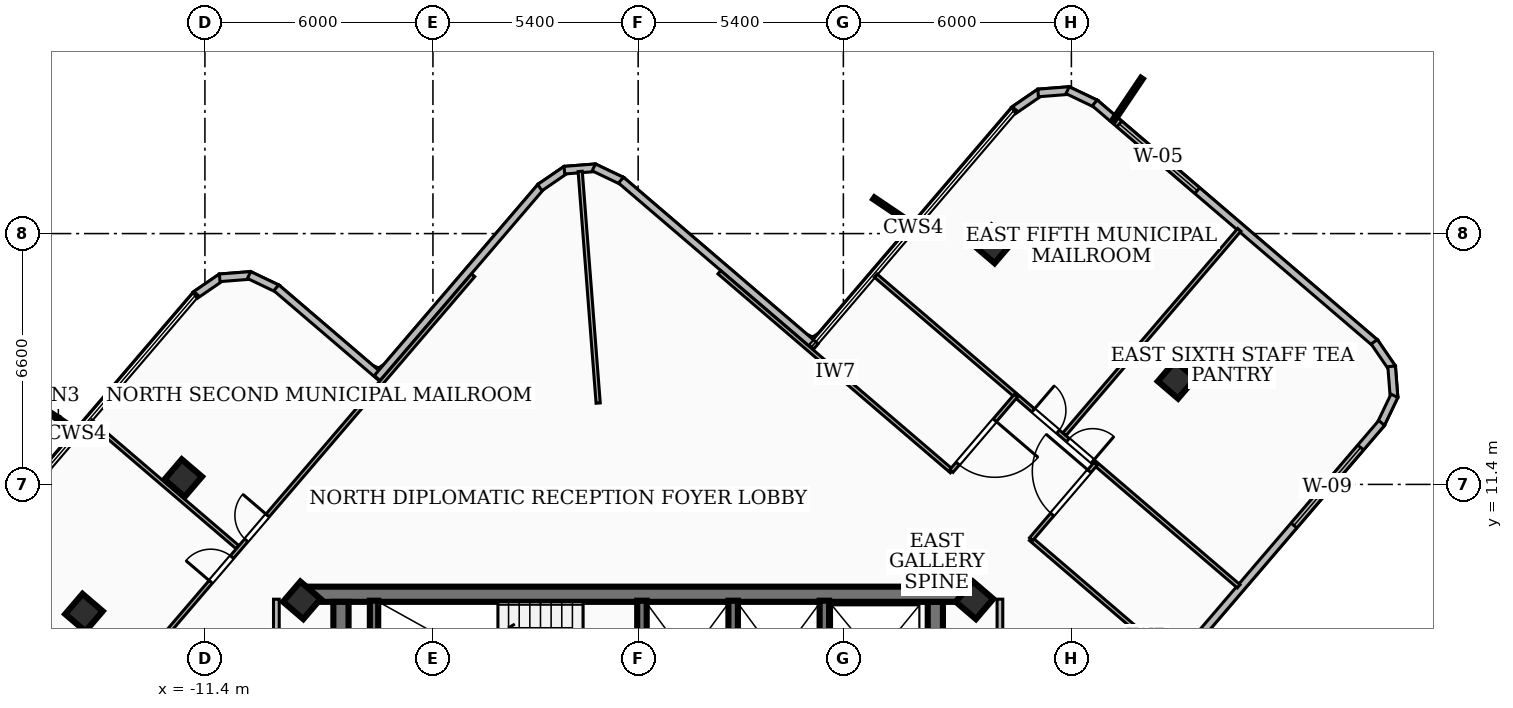
"""IFC4 building model, lengths in metres.
Left out: names, types, materials, properties, quantities, classifications, styles, units other than length and angle.
Written with IfcOpenShell. Run it as: python <this file> out.ifc"""

import sys

from ifc_helpers import new_model, si_unit, direction, frame, frame_2d, origin, origin_2d, place, context, subcontext, project, spatial, rectangle, extrude, element, fill, save


model = new_model("IFC4")
c1 = context("Model", 3, precision=1e-05, world=origin(), true_north=direction((0.0, 1.0)))
c2 = subcontext(c1, "Body", "Model", "MODEL_VIEW")
j1 = project(units=[si_unit("LENGTHUNIT", "METRE"), si_unit("PLANEANGLEUNIT", "RADIAN")], contexts=[c1])
p1 = place(None, origin())
s1 = spatial("IfcSite", under=j1, at=p1, CompositionType="ELEMENT")
p2 = place(p1, origin())
s2 = spatial("IfcBuilding", under=s1, at=p2, CompositionType="ELEMENT")
p3 = place(p2, frame((0.0, 0.0, 254.34)))
s3 = spatial("IfcBuildingStorey", under=s2, at=p3, CompositionType="ELEMENT", Elevation=254.34)
p4 = place(p3, frame((-8.78, 8.51, 0.0), z_axis=(0.0, 0.0, 1.0), x_axis=(1.0, 0.0, 0.0)))
e1 = element("IfcWall", 1, at=p4, inside=s3, PredefinedType="SHEAR", context=c2, shape_type="SweptSolid", body=[
    extrude(rectangle(XDim=17.56, YDim=0.4, at=frame_2d((8.78, 0.0))), origin(), (0.0, 0.0, 1.0), 3.16),
])
for number, where, z_axis, x_axis in (
    (2, (-7.82, 1.95, 0.0), (0.0, 0.0, 1.0), (0.0, 1.0, 0.0)),
    (3, (7.82, 8.31, 0.0), (0.0, 0.0, 1.0), (0.0, -1.0, 0.0)),
):
    element("IfcWall", number, at=place(p3, frame(where, z_axis=z_axis, x_axis=x_axis)), inside=s3, PredefinedType="SHEAR", context=c2, shape_type="SweptSolid", body=[
        extrude(rectangle(XDim=6.36, YDim=0.4, at=frame_2d((3.18, 0.0))), origin(), (0.0, 0.0, 1.0), 3.16),
    ])
p5 = place(p3, frame((-6.95, 5.28, 0.0), z_axis=(0.0, 0.0, 1.0), x_axis=(0.0, 1.0, 0.0)))
e4 = element("IfcWall", 4, at=p5, inside=s3, PredefinedType="SOLIDWALL", context=c2, shape_type="SweptSolid", body=[
    extrude(rectangle(XDim=3.06, YDim=0.22, at=frame_2d((1.53, 0.0))), origin(), (0.0, 0.0, 1.0), 3.16),
])
for number, where, z_axis, x_axis in (
    (5, (0.1, 5.3, 0.0), (0.0, 0.0, 1.0), (0.0, 1.0, 0.0)),
    (6, (2.5, 5.3, 0.0), (0.0, 0.0, 1.0), (0.0, 1.0, 0.0)),
    (7, (4.9, 5.3, 0.0), (0.0, 0.0, 1.0), (0.0, 1.0, 0.0)),
):
    element("IfcWall", number, at=place(p3, frame(where, z_axis=z_axis, x_axis=x_axis)), inside=s3, PredefinedType="SOLIDWALL", context=c2, shape_type="SweptSolid", body=[
        extrude(rectangle(XDim=3.04, YDim=0.25, at=frame_2d((1.52, 0.0))), origin(), (0.0, 0.0, 1.0), 3.16),
    ])
for number, where, z_axis, x_axis in (
    (8, (-8.85, 8.35, 0.0), (0.0, 0.0, 1.0), (0.65, 0.76, 0.0)),
    (9, (8.85, 8.35, 0.0), (0.0, 0.0, 1.0), (0.65, 0.76, 0.0)),
    (10, (14.169, 14.152, 0.0), (0.0, 0.0, 1.0), (0.65, 0.76, 0.0)),
    (11, (9.341, 17.714, 0.0), (0.0, 0.0, 1.0), (0.65, 0.76, 0.0)),
    (12, (-11.971, 11.566, 0.0), (0.0, 0.0, 1.0), (0.65, 0.76, 0.0)),
    (13, (-14.583, 8.026, 0.0), (0.0, 0.0, 1.0), (0.65, 0.76, 0.0)),
):
    element("IfcColumn", number, at=place(p3, frame(where, z_axis=z_axis, x_axis=x_axis)), inside=s3, PredefinedType="COLUMN", context=c2, shape_type="SweptSolid", body=[
        extrude(rectangle(XDim=0.7, YDim=0.7, at=origin_2d()), origin(), (0.0, 0.0, 1.0), 3.42),
    ])
p6 = place(p3, frame((-11.658, 16.378, 0.0), z_axis=(0.0, 0.0, 1.0), x_axis=(0.824907237821, 0.565268121329, 0.0)))
e14 = element("IfcWall", 14, at=p6, inside=s3, PredefinedType="SOLIDWALL", context=c2, shape_type="SweptSolid", body=[
    extrude(rectangle(XDim=0.839, YDim=0.2, at=frame_2d((0.419, 0.0))), origin(), (0.0, 0.0, 1.0), 3.16),
])
p7 = place(p3, frame((-11.012, 16.836, 0.0), z_axis=(0.0, 0.0, 1.0), x_axis=(0.996986164412, 0.077579558977, 0.0)))
e15 = element("IfcWall", 15, at=p7, inside=s3, PredefinedType="SOLIDWALL", context=c2, shape_type="SweptSolid", body=[
    extrude(rectangle(XDim=0.824, YDim=0.2, at=frame_2d((0.412, 0.0))), origin(), (0.0, 0.0, 1.0), 3.16),
])
p8 = place(p3, frame((-10.238, 16.909, 0.0), z_axis=(0.0, 0.0, 1.0), x_axis=(0.902473334209, -0.430745726666, 0.0)))
e16 = element("IfcWall", 16, at=p8, inside=s3, PredefinedType="SOLIDWALL", context=c2, shape_type="SweptSolid", body=[
    extrude(rectangle(XDim=0.84, YDim=0.2, at=frame_2d((0.42, 0.0))), origin(), (0.0, 0.0, 1.0), 3.16),
])
p9 = place(p3, frame((-9.522, 16.574, 0.0), z_axis=(0.0, 0.0, 1.0), x_axis=(0.759914066759, -0.650023546606, 0.0)))
e17 = element("IfcWall", 17, at=p9, inside=s3, PredefinedType="SOLIDWALL", context=c2, shape_type="SweptSolid", body=[
    extrude(rectangle(XDim=3.641, YDim=0.2, at=frame_2d((1.821, 0.0))), origin(), (0.0, 0.0, 1.0), 3.16),
])
p10 = place(p3, frame((-6.868, 14.198, 0.0), z_axis=(0.0, 0.0, 1.0), x_axis=(0.650240147413, 0.759728734939, 0.0)))
e18 = element("IfcWall", 18, at=p10, inside=s3, PredefinedType="SOLIDWALL", context=c2, shape_type="SweptSolid", body=[
    extrude(rectangle(XDim=6.64, YDim=0.2, at=frame_2d((3.32, 0.0))), origin(), (0.0, 0.0, 1.0), 3.16),
])
p11 = place(p3, frame((-2.587, 19.21, 0.0), z_axis=(0.0, 0.0, 1.0), x_axis=(0.824907237821, 0.565268121329, 0.0)))
e19 = element("IfcWall", 19, at=p11, inside=s3, PredefinedType="SOLIDWALL", context=c2, shape_type="SweptSolid", body=[
    extrude(rectangle(XDim=0.839, YDim=0.2, at=frame_2d((0.419, 0.0))), origin(), (0.0, 0.0, 1.0), 3.16),
])
p12 = place(p3, frame((-1.941, 19.668, 0.0), z_axis=(0.0, 0.0, 1.0), x_axis=(0.996986164412, 0.077579558977, 0.0)))
e20 = element("IfcWall", 20, at=p12, inside=s3, PredefinedType="SOLIDWALL", context=c2, shape_type="SweptSolid", body=[
    extrude(rectangle(XDim=0.824, YDim=0.2, at=frame_2d((0.412, 0.0))), origin(), (0.0, 0.0, 1.0), 3.16),
])
p13 = place(p3, frame((-1.167, 19.741, 0.0), z_axis=(0.0, 0.0, 1.0), x_axis=(0.902360330408, -0.430982405796, 0.0)))
e21 = element("IfcWall", 21, at=p13, inside=s3, PredefinedType="SOLIDWALL", context=c2, shape_type="SweptSolid", body=[
    extrude(rectangle(XDim=0.84, YDim=0.2, at=frame_2d((0.42, 0.0))), origin(), (0.0, 0.0, 1.0), 3.16),
])
p14 = place(p3, frame((-0.451, 19.406, 0.0), z_axis=(0.0, 0.0, 1.0), x_axis=(0.759775314842, -0.650185720357, 0.0)))
e22 = element("IfcWall", 22, at=p14, inside=s3, PredefinedType="SOLIDWALL", context=c2, shape_type="SweptSolid", body=[
    extrude(rectangle(XDim=6.741, YDim=0.2, at=frame_2d((3.371, 0.0))), origin(), (0.0, 0.0, 1.0), 3.16),
])
p15 = place(p3, frame((9.88, 21.242, 0.0), z_axis=(0.0, 0.0, 1.0), x_axis=(0.825000211037, 0.565132419694, 0.0)))
e23 = element("IfcWall", 23, at=p15, inside=s3, PredefinedType="SOLIDWALL", context=c2, shape_type="SweptSolid", body=[
    extrude(rectangle(XDim=0.839, YDim=0.2, at=frame_2d((0.419, 0.0))), origin(), (0.0, 0.0, 1.0), 3.16),
])
p16 = place(p3, frame((10.526, 21.7, 0.0), z_axis=(0.0, 0.0, 1.0), x_axis=(0.996986164412, 0.077579558977, 0.0)))
e24 = element("IfcWall", 24, at=p16, inside=s3, PredefinedType="SOLIDWALL", context=c2, shape_type="SweptSolid", body=[
    extrude(rectangle(XDim=0.824, YDim=0.2, at=frame_2d((0.412, 0.0))), origin(), (0.0, 0.0, 1.0), 3.16),
])
p17 = place(p3, frame((11.3, 21.773, 0.0), z_axis=(0.0, 0.0, 1.0), x_axis=(0.902089895834, -0.431548166297, 0.0)))
e25 = element("IfcWall", 25, at=p17, inside=s3, PredefinedType="SOLIDWALL", context=c2, shape_type="SweptSolid", body=[
    extrude(rectangle(XDim=0.839, YDim=0.2, at=frame_2d((0.419, 0.0))), origin(), (0.0, 0.0, 1.0), 3.16),
])
p18 = place(p3, frame((12.015, 21.438, 0.0), z_axis=(0.0, 0.0, 1.0), x_axis=(0.75980042935, -0.650156371622, 0.0)))
e26 = element("IfcWall", 26, at=p18, inside=s3, PredefinedType="SOLIDWALL", context=c2, shape_type="SweptSolid", body=[
    extrude(rectangle(XDim=9.724, YDim=0.2, at=frame_2d((4.862, 0.0))), origin(), (0.0, 0.0, 1.0), 3.16),
])
p19 = place(p18, frame((0.85, 0.0, 0.85)))
e27 = element("IfcOpeningElement", 27, at=p19, cuts=e26, PredefinedType="OPENING", context=c2, shape_type="SweptSolid", body=[
    extrude(rectangle(XDim=2.7, YDim=1.85, at=frame_2d((1.35, 0.925))), frame((0.0, 0.11, 0.0), z_axis=(0.0, -1.0, 0.0), x_axis=(1.0, 0.0, 0.0)), (0.0, 0.0, 1.0), 0.22),
])
p20 = place(p3, frame((19.37, 15.153, 0.0), z_axis=(0.0, 0.0, 1.0), x_axis=(0.564140869434, -0.825678556967, 0.0)))
e28 = element("IfcWall", 28, at=p20, inside=s3, PredefinedType="SOLIDWALL", context=c2, shape_type="SweptSolid", body=[
    extrude(rectangle(XDim=0.838, YDim=0.2, at=frame_2d((0.419, 0.0))), origin(), (0.0, 0.0, 1.0), 3.16),
])
p21 = place(p3, frame((19.827, 14.507, 0.0), z_axis=(0.0, 0.0, 1.0), x_axis=(0.07778202678, -0.996970388883, 0.0)))
e29 = element("IfcWall", 29, at=p21, inside=s3, PredefinedType="SOLIDWALL", context=c2, shape_type="SweptSolid", body=[
    extrude(rectangle(XDim=0.825, YDim=0.2, at=frame_2d((0.413, 0.0))), origin(), (0.0, 0.0, 1.0), 3.16),
])
p22 = place(p3, frame((19.9, 13.732, 0.0), z_axis=(0.0, 0.0, 1.0), x_axis=(-0.431311318386, -0.902203162615, 0.0)))
e30 = element("IfcWall", 30, at=p22, inside=s3, PredefinedType="SOLIDWALL", context=c2, shape_type="SweptSolid", body=[
    extrude(rectangle(XDim=0.839, YDim=0.2, at=frame_2d((0.419, 0.0))), origin(), (0.0, 0.0, 1.0), 3.16),
])
p23 = place(p3, frame((19.565, 13.017, 0.0), z_axis=(0.0, 0.0, 1.0), x_axis=(-0.650112914542, -0.759837613142, 0.0)))
e31 = element("IfcWall", 31, at=p23, inside=s3, PredefinedType="SOLIDWALL", context=c2, shape_type="SweptSolid", body=[
    extrude(rectangle(XDim=8.241, YDim=0.2, at=frame_2d((4.121, 0.0))), origin(), (0.0, 0.0, 1.0), 3.16),
])
p24 = place(p23, frame((0.85, 0.0, 0.85)))
e32 = element("IfcOpeningElement", 32, at=p24, cuts=e31, PredefinedType="OPENING", context=c2, shape_type="SweptSolid", body=[
    extrude(rectangle(XDim=2.7, YDim=1.65, at=frame_2d((1.35, 0.825))), frame((0.0, 0.11, 0.0), z_axis=(0.0, -1.0, 0.0), x_axis=(1.0, 0.0, 0.0)), (0.0, 0.0, 1.0), 0.22),
])
p25 = place(p3, frame((-9.52, 1.75, 0.0), z_axis=(0.0, 0.0, 1.0), x_axis=(0.0, 1.0, 0.0)))
e33 = element("IfcWall", 33, at=p25, inside=s3, PredefinedType="PARTITIONING", context=c2, shape_type="SweptSolid", body=[
    extrude(rectangle(XDim=6.63, YDim=0.15, at=frame_2d((3.315, 0.0))), origin(), (0.0, 0.0, 1.0), 2.53),
])
p26 = place(p3, frame((9.52, 1.75, 0.0), z_axis=(0.0, 0.0, 1.0), x_axis=(0.0, 1.0, 0.0)))
e34 = element("IfcWall", 34, at=p26, inside=s3, PredefinedType="PARTITIONING", context=c2, shape_type="SweptSolid", body=[
    extrude(rectangle(XDim=6.63, YDim=0.15, at=frame_2d((3.315, 0.0))), origin(), (0.0, 0.0, 1.0), 3.16),
])
p27 = place(p3, frame((-1.052, 13.54, 0.0), z_axis=(0.0, 0.0, 1.0), x_axis=(-0.077356131702, 0.997003525013, 0.0)))
e35 = element("IfcWall", 35, at=p27, inside=s3, PredefinedType="PARTITIONING", context=c2, shape_type="SweptSolid", body=[
    extrude(rectangle(XDim=6.113, YDim=0.11, at=frame_2d((3.057, 0.0))), origin(), (0.0, 0.0, 1.0), 3.16),
])
p28 = place(p3, frame((8.251, 11.747, 0.0), z_axis=(0.0, 0.0, 1.0), x_axis=(-0.759658945325, 0.650321679469, 0.0)))
e36 = element("IfcWall", 36, at=p28, inside=s3, PredefinedType="PARTITIONING", context=c2, shape_type="SweptSolid", body=[
    extrude(rectangle(XDim=8.05, YDim=0.11, at=frame_2d((4.025, 0.0))), origin(), (0.0, 0.0, 1.0), 3.16),
])
p29 = place(p3, frame((16.372, 4.796, 0.0), z_axis=(0.0, 0.0, 1.0), x_axis=(-0.759640163548, 0.650343618348, 0.0)))
e37 = element("IfcWall", 37, at=p29, inside=s3, PredefinedType="PARTITIONING", context=c2, shape_type="SweptSolid", body=[
    extrude(rectangle(XDim=7.95, YDim=0.11, at=frame_2d((3.975, 0.0))), origin(), (0.0, 0.0, 1.0), 2.53),
])
p30 = place(p3, frame((9.941, 13.737, 0.0), z_axis=(0.0, 0.0, 1.0), x_axis=(-0.65016721503, -0.759791150581, 0.0)))
e38 = element("IfcWall", 38, at=p30, inside=s3, PredefinedType="PARTITIONING", context=c2, shape_type="SweptSolid", body=[
    extrude(rectangle(XDim=2.61, YDim=0.11, at=frame_2d((1.305, 0.0))), origin(), (0.0, 0.0, 1.0), 2.53),
])
p31 = place(p30, frame((0.855, 0.0, 0.0)))
e39 = element("IfcOpeningElement", 39, at=p31, cuts=e38, PredefinedType="OPENING", context=c2, shape_type="SweptSolid", body=[
    extrude(rectangle(XDim=1.5, YDim=2.12, at=frame_2d((0.75, 1.06))), frame((0.0, 0.065, 0.0), z_axis=(0.0, -1.0, 0.0), x_axis=(1.0, 0.0, 0.0)), (0.0, 0.0, 1.0), 0.13),
])
p32 = place(p3, frame((10.34, 9.959, 0.0), z_axis=(0.0, 0.0, 1.0), x_axis=(0.650429323352, 0.759566781346, 0.0)))
e40 = element("IfcWall", 40, at=p32, inside=s3, PredefinedType="PARTITIONING", context=c2, shape_type="SweptSolid", body=[
    extrude(rectangle(XDim=2.611, YDim=0.11, at=frame_2d((1.305, 0.0))), origin(), (0.0, 0.0, 1.0), 2.53),
])
p33 = place(p32, frame((0.855, 0.0, 0.0)))
e41 = element("IfcOpeningElement", 41, at=p33, cuts=e40, PredefinedType="OPENING", context=c2, shape_type="SweptSolid", body=[
    extrude(rectangle(XDim=1.5, YDim=2.12, at=frame_2d((0.75, 1.06))), frame((0.0, 0.065, 0.0), z_axis=(0.0, -1.0, 0.0), x_axis=(1.0, 0.0, 0.0)), (0.0, 0.0, 1.0), 0.13),
])
p34 = place(p3, frame((11.218, 12.722, 0.0), z_axis=(0.0, 0.0, 1.0), x_axis=(0.650148936059, 0.75980679185, 0.0)))
e42 = element("IfcWall", 42, at=p34, inside=s3, PredefinedType="PARTITIONING", context=c2, shape_type="SweptSolid", body=[
    extrude(rectangle(XDim=7.075, YDim=0.11, at=frame_2d((3.538, 0.0))), origin(), (0.0, 0.0, 1.0), 3.16),
])
p35 = place(p3, frame((6.252, 16.894, 0.0), z_axis=(0.0, 0.0, 1.0), x_axis=(0.759715677597, -0.650255403063, 0.0)))
e43 = element("IfcWall", 43, at=p35, inside=s3, PredefinedType="PARTITIONING", context=c2, shape_type="SweptSolid", body=[
    extrude(rectangle(XDim=12.571, YDim=0.11, at=frame_2d((6.285, 0.0))), origin(), (0.0, 0.0, 1.0), 2.53),
])
p36 = place(p35, frame((6.655, 0.0, 0.0)))
e44 = element("IfcOpeningElement", 44, at=p36, cuts=e43, PredefinedType="OPENING", context=c2, shape_type="SweptSolid", body=[
    extrude(rectangle(XDim=0.86, YDim=2.04, at=frame_2d((0.43, 1.02))), frame((0.0, 0.065, 0.0), z_axis=(0.0, -1.0, 0.0), x_axis=(1.0, 0.0, 0.0)), (0.0, 0.0, 1.0), 0.13),
])
p37 = place(p35, frame((5.455, 0.0, 0.0)))
e45 = element("IfcOpeningElement", 45, at=p37, cuts=e43, PredefinedType="OPENING", context=c2, shape_type="SweptSolid", body=[
    extrude(rectangle(XDim=0.86, YDim=2.04, at=frame_2d((0.43, 1.02))), frame((0.0, 0.065, 0.0), z_axis=(0.0, -1.0, 0.0), x_axis=(1.0, 0.0, 0.0)), (0.0, 0.0, 1.0), 0.13),
])
p38 = place(p3, frame((-10.544, 9.749, 0.0), z_axis=(0.0, 0.0, 1.0), x_axis=(-0.759849347966, 0.650099198889, 0.0)))
e46 = element("IfcWall", 46, at=p38, inside=s3, PredefinedType="PARTITIONING", context=c2, shape_type="SweptSolid", body=[
    extrude(rectangle(XDim=5.085, YDim=0.11, at=frame_2d((2.542, 0.0))), origin(), (0.0, 0.0, 1.0), 3.16),
])
p39 = place(p3, frame((-17.437, 1.604, 0.0), z_axis=(0.0, 0.0, 1.0), x_axis=(0.650265099033, 0.759707378522, 0.0)))
e47 = element("IfcWall", 47, at=p39, inside=s3, PredefinedType="PARTITIONING", context=c2, shape_type="SweptSolid", body=[
    extrude(rectangle(XDim=20.139, YDim=0.11, at=frame_2d((10.07, 0.0))), origin(), (0.0, 0.0, 1.0), 2.53),
])
p40 = place(p39, frame((10.959, 0.0, 0.0)))
e48 = element("IfcOpeningElement", 48, at=p40, cuts=e47, PredefinedType="OPENING", context=c2, shape_type="SweptSolid", body=[
    extrude(rectangle(XDim=0.86, YDim=2.04, at=frame_2d((0.43, 1.02))), frame((0.0, 0.065, 0.0), z_axis=(0.0, -1.0, 0.0), x_axis=(1.0, 0.0, 0.0)), (0.0, 0.0, 1.0), 0.13),
])
p41 = place(p39, frame((9.519, 0.0, 0.0)))
e49 = element("IfcOpeningElement", 49, at=p41, cuts=e47, PredefinedType="OPENING", context=c2, shape_type="SweptSolid", body=[
    extrude(rectangle(XDim=0.86, YDim=2.04, at=frame_2d((0.43, 1.02))), frame((0.0, 0.065, 0.0), z_axis=(0.0, -1.0, 0.0), x_axis=(1.0, 0.0, 0.0)), (0.0, 0.0, 1.0), 0.13),
])
p42 = place(p19, origin())
e50 = element("IfcWindow", 50, at=p42, inside=s3, PartitioningType="SINGLE_PANEL", PredefinedType="WINDOW", context=c2, shape_type="SweptSolid", body=[
    extrude(rectangle(XDim=2.7, YDim=1.85, at=frame_2d((1.35, 0.925))), frame((0.0, 0.03, 0.0), z_axis=(0.0, -1.0, 0.0), x_axis=(1.0, 0.0, 0.0)), (0.0, 0.0, 1.0), 0.06),
])
fill(e27, e50)
p43 = place(p24, origin())
e51 = element("IfcWindow", 51, at=p43, inside=s3, PartitioningType="SINGLE_PANEL", PredefinedType="WINDOW", context=c2, shape_type="SweptSolid", body=[
    extrude(rectangle(XDim=2.7, YDim=1.65, at=frame_2d((1.35, 0.825))), frame((0.0, 0.03, 0.0), z_axis=(0.0, -1.0, 0.0), x_axis=(1.0, 0.0, 0.0)), (0.0, 0.0, 1.0), 0.06),
])
fill(e32, e51)
p44 = place(p31, origin())
e52 = element("IfcDoor", 52, at=p44, inside=s3, OperationType="SINGLE_SWING_LEFT", PredefinedType="DOOR", context=c2, shape_type="SweptSolid", body=[
    extrude(rectangle(XDim=1.5, YDim=2.12, at=frame_2d((0.75, 1.06))), frame((0.0, 0.025, 0.0), z_axis=(0.0, -1.0, 0.0), x_axis=(1.0, 0.0, 0.0)), (0.0, 0.0, 1.0), 0.05),
])
fill(e39, e52)
p45 = place(p33, origin())
e53 = element("IfcDoor", 53, at=p45, inside=s3, OperationType="SINGLE_SWING_RIGHT", PredefinedType="DOOR", context=c2, shape_type="SweptSolid", body=[
    extrude(rectangle(XDim=1.5, YDim=2.12, at=frame_2d((0.75, 1.06))), frame((0.0, 0.025, 0.0), z_axis=(0.0, -1.0, 0.0), x_axis=(1.0, 0.0, 0.0)), (0.0, 0.0, 1.0), 0.05),
])
fill(e41, e53)
p46 = place(p36, origin())
e54 = element("IfcDoor", 54, at=p46, inside=s3, OperationType="SINGLE_SWING_RIGHT", PredefinedType="DOOR", context=c2, shape_type="SweptSolid", body=[
    extrude(rectangle(XDim=0.86, YDim=2.04, at=frame_2d((0.43, 1.02))), frame((0.0, 0.025, 0.0), z_axis=(0.0, -1.0, 0.0), x_axis=(1.0, 0.0, 0.0)), (0.0, 0.0, 1.0), 0.05),
])
fill(e44, e54)
p47 = place(p37, origin())
e55 = element("IfcDoor", 55, at=p47, inside=s3, OperationType="SINGLE_SWING_LEFT", PredefinedType="DOOR", context=c2, shape_type="SweptSolid", body=[
    extrude(rectangle(XDim=0.86, YDim=2.04, at=frame_2d((0.43, 1.02))), frame((0.0, 0.025, 0.0), z_axis=(0.0, -1.0, 0.0), x_axis=(1.0, 0.0, 0.0)), (0.0, 0.0, 1.0), 0.05),
])
fill(e45, e55)
p48 = place(p40, origin())
e56 = element("IfcDoor", 56, at=p48, inside=s3, OperationType="SINGLE_SWING_RIGHT", PredefinedType="DOOR", context=c2, shape_type="SweptSolid", body=[
    extrude(rectangle(XDim=0.86, YDim=2.04, at=frame_2d((0.43, 1.02))), frame((0.0, 0.025, 0.0), z_axis=(0.0, -1.0, 0.0), x_axis=(1.0, 0.0, 0.0)), (0.0, 0.0, 1.0), 0.05),
])
fill(e48, e56)
p49 = place(p41, origin())
e57 = element("IfcDoor", 57, at=p49, inside=s3, OperationType="SINGLE_SWING_LEFT", PredefinedType="DOOR", context=c2, shape_type="SweptSolid", body=[
    extrude(rectangle(XDim=0.86, YDim=2.04, at=frame_2d((0.43, 1.02))), frame((0.0, 0.025, 0.0), z_axis=(0.0, -1.0, 0.0), x_axis=(1.0, 0.0, 0.0)), (0.0, 0.0, 1.0), 0.05),
])
fill(e49, e57)
save(model, sys.argv[1])
